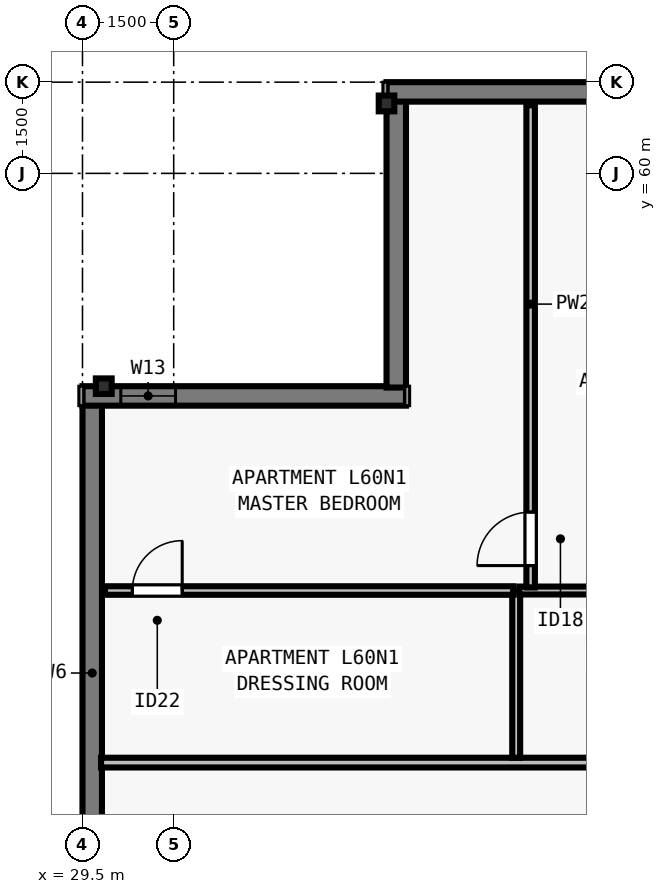
"""IFC4 building model, lengths in metres.
Left out: names, types, materials, properties, quantities, classifications, styles, units other than length and angle.
Written with IfcOpenShell. Run it as: python <this file> out.ifc"""

import sys

from ifc_helpers import new_model, si_unit, direction, frame, frame_2d, origin, origin_2d, place, context, subcontext, project, spatial, rectangle, i_section, extrude, element, fill, save


model = new_model("IFC4")
c1 = context("Model", 3, precision=1e-05, world=origin(), true_north=direction((0.0, 1.0)))
c2 = subcontext(c1, "Body", "Model", "MODEL_VIEW")
j1 = project(units=[si_unit("LENGTHUNIT", "METRE"), si_unit("PLANEANGLEUNIT", "RADIAN")], contexts=[c1])
p1 = place(None, origin())
s1 = spatial("IfcSite", under=j1, at=p1, CompositionType="ELEMENT")
p2 = place(p1, origin())
s2 = spatial("IfcBuilding", under=s1, at=p2, CompositionType="ELEMENT")
p3 = place(p2, frame((0.0, 0.0, 220.0)))
s3 = spatial("IfcBuildingStorey", under=s2, at=p3, CompositionType="ELEMENT", Elevation=220.0)
for number, where, z_axis, x_axis in (
    (1, (34.5, 61.15, 0.0), (0.0, 0.0, 1.0), (1.0, 0.0, 0.0)),
    (2, (29.85, 56.5, 0.0), (0.0, 0.0, 1.0), (0.0, 1.0, 0.0)),
):
    element("IfcColumn", number, at=place(p3, frame(where, z_axis=z_axis, x_axis=x_axis)), inside=s3, PredefinedType="COLUMN", context=c2, shape_type="SweptSolid", body=[
        extrude(i_section(OverallWidth=0.256, OverallDepth=0.26, WebThickness=0.01, FlangeThickness=0.017, FilletRadius=0.013, at=origin_2d()), origin(), (0.0, 0.0, 1.0), 3.5),
    ])
p4 = place(p3, frame((29.66, 21.5, 0.0), z_axis=(0.0, 0.0, 1.0), x_axis=(0.0, 1.0, 0.0)))
e3 = element("IfcWall", 3, at=p4, inside=s3, PredefinedType="SOLIDWALL", context=c2, shape_type="SweptSolid", body=[
    extrude(rectangle(XDim=34.702, YDim=0.32, at=frame_2d((17.351, 0.0))), origin(), (0.0, 0.0, 1.0), 3.29),
])
p5 = place(p4, frame((4.312, 0.0, 0.8)))
e4 = element("IfcOpeningElement", 4, at=p5, cuts=e3, PredefinedType="OPENING", context=c2, shape_type="SweptSolid", body=[
    extrude(rectangle(XDim=1.55, YDim=1.678, at=frame_2d((0.775, 0.839))), frame((0.0, 0.17, 0.0), z_axis=(0.0, -1.0, 0.0), x_axis=(1.0, 0.0, 0.0)), (0.0, 0.0, 1.0), 0.34),
])
p6 = place(p4, frame((6.738, 0.0, 0.8)))
e5 = element("IfcOpeningElement", 5, at=p6, cuts=e3, PredefinedType="OPENING", context=c2, shape_type="SweptSolid", body=[
    extrude(rectangle(XDim=1.85, YDim=1.678, at=frame_2d((0.925, 0.839))), frame((0.0, 0.17, 0.0), z_axis=(0.0, -1.0, 0.0), x_axis=(1.0, 0.0, 0.0)), (0.0, 0.0, 1.0), 0.34),
])
p7 = place(p4, frame((10.263, 0.0, 0.8)))
e6 = element("IfcOpeningElement", 6, at=p7, cuts=e3, PredefinedType="OPENING", context=c2, shape_type="SweptSolid", body=[
    extrude(rectangle(XDim=1.55, YDim=1.678, at=frame_2d((0.775, 0.839))), frame((0.0, 0.17, 0.0), z_axis=(0.0, -1.0, 0.0), x_axis=(1.0, 0.0, 0.0)), (0.0, 0.0, 1.0), 0.34),
])
p8 = place(p4, frame((14.738, 0.0, 0.8)))
e7 = element("IfcOpeningElement", 7, at=p8, cuts=e3, PredefinedType="OPENING", context=c2, shape_type="SweptSolid", body=[
    extrude(rectangle(XDim=1.85, YDim=1.678, at=frame_2d((0.925, 0.839))), frame((0.0, 0.17, 0.0), z_axis=(0.0, -1.0, 0.0), x_axis=(1.0, 0.0, 0.0)), (0.0, 0.0, 1.0), 0.34),
])
p9 = place(p4, frame((18.264, 0.0, 0.8)))
e8 = element("IfcOpeningElement", 8, at=p9, cuts=e3, PredefinedType="OPENING", context=c2, shape_type="SweptSolid", body=[
    extrude(rectangle(XDim=1.55, YDim=1.678, at=frame_2d((0.775, 0.839))), frame((0.0, 0.17, 0.0), z_axis=(0.0, -1.0, 0.0), x_axis=(1.0, 0.0, 0.0)), (0.0, 0.0, 1.0), 0.34),
])
p10 = place(p4, frame((24.164, 0.0, 0.8)))
e9 = element("IfcOpeningElement", 9, at=p10, cuts=e3, PredefinedType="OPENING", context=c2, shape_type="SweptSolid", body=[
    extrude(rectangle(XDim=1.55, YDim=1.678, at=frame_2d((0.775, 0.839))), frame((0.0, 0.17, 0.0), z_axis=(0.0, -1.0, 0.0), x_axis=(1.0, 0.0, 0.0)), (0.0, 0.0, 1.0), 0.34),
])
p11 = place(p3, frame((29.5, 56.34, 0.0), z_axis=(0.0, 0.0, 1.0), x_axis=(1.0, 0.0, 0.0)))
e10 = element("IfcWall", 10, at=p11, inside=s3, PredefinedType="SOLIDWALL", context=c2, shape_type="SweptSolid", body=[
    extrude(rectangle(XDim=5.32, YDim=0.32, at=frame_2d((2.66, 0.0))), origin(), (0.0, 0.0, 1.0), 3.29),
])
p12 = place(p11, frame((0.63, 0.0, 0.8)))
e11 = element("IfcOpeningElement", 11, at=p12, cuts=e10, PredefinedType="OPENING", context=c2, shape_type="SweptSolid", body=[
    extrude(rectangle(XDim=0.9, YDim=1.678, at=frame_2d((0.45, 0.839))), frame((0.0, 0.17, 0.0), z_axis=(0.0, -1.0, 0.0), x_axis=(1.0, 0.0, 0.0)), (0.0, 0.0, 1.0), 0.34),
])
p13 = place(p3, frame((34.66, 56.478, 0.0), z_axis=(0.0, 0.0, 1.0), x_axis=(0.0, 1.0, 0.0)))
e12 = element("IfcWall", 12, at=p13, inside=s3, PredefinedType="SOLIDWALL", context=c2, shape_type="SweptSolid", body=[
    extrude(rectangle(XDim=4.724, YDim=0.32, at=frame_2d((2.362, 0.0))), origin(), (0.0, 0.0, 1.0), 3.29),
])
p14 = place(p3, frame((34.5, 61.34, 0.0), z_axis=(0.0, 0.0, 1.0), x_axis=(1.0, 0.0, 0.0)))
e13 = element("IfcWall", 13, at=p14, inside=s3, PredefinedType="SOLIDWALL", context=c2, shape_type="SweptSolid", body=[
    extrude(rectangle(XDim=5.602, YDim=0.32, at=frame_2d((2.801, 0.0))), origin(), (0.0, 0.0, 1.0), 3.29),
])
p15 = place(p3, frame((29.805, 50.31, 0.0), z_axis=(0.0, 0.0, 1.0), x_axis=(1.0, 0.0, 0.0)))
e14 = element("IfcWall", 14, at=p15, inside=s3, PredefinedType="PARTITIONING", context=c2, shape_type="SweptSolid", body=[
    extrude(rectangle(XDim=44.39, YDim=0.16, at=frame_2d((22.195, 0.0))), origin(), (0.0, 0.0, 1.0), 2.958),
])
p16 = place(p15, frame((10.448, 0.0, 0.0)))
e15 = element("IfcOpeningElement", 15, at=p16, cuts=e14, PredefinedType="OPENING", context=c2, shape_type="SweptSolid", body=[
    extrude(rectangle(XDim=0.96, YDim=2.18, at=frame_2d((0.48, 1.09))), frame((0.0, 0.09, 0.0), z_axis=(0.0, -1.0, 0.0), x_axis=(1.0, 0.0, 0.0)), (0.0, 0.0, 1.0), 0.18),
])
p17 = place(p15, frame((32.528, 0.0, 0.0)))
e16 = element("IfcOpeningElement", 16, at=p17, cuts=e14, PredefinedType="OPENING", context=c2, shape_type="SweptSolid", body=[
    extrude(rectangle(XDim=0.96, YDim=2.18, at=frame_2d((0.48, 1.09))), frame((0.0, 0.09, 0.0), z_axis=(0.0, -1.0, 0.0), x_axis=(1.0, 0.0, 0.0)), (0.0, 0.0, 1.0), 0.18),
])
p18 = place(p3, frame((36.633, 50.39, 0.0), z_axis=(0.0, 0.0, 1.0), x_axis=(0.0, 1.0, 0.0)))
e17 = element("IfcWall", 17, at=p18, inside=s3, PredefinedType="PLUMBINGWALL", context=c2, shape_type="SweptSolid", body=[
    extrude(rectangle(XDim=2.75, YDim=0.13, at=frame_2d((1.375, 0.0))), origin(), (0.0, 0.0, 1.0), 3.29),
])
p19 = place(p3, frame((36.683, 53.14, 0.0), z_axis=(0.0, 0.0, 1.0), x_axis=(1.0, 0.0, 0.0)))
e18 = element("IfcWall", 18, at=p19, inside=s3, PredefinedType="PLUMBINGWALL", context=c2, shape_type="SweptSolid", body=[
    extrude(rectangle(XDim=2.85, YDim=0.13, at=frame_2d((1.425, 0.0))), origin(), (0.0, 0.0, 1.0), 3.29),
])
p20 = place(p3, frame((36.87, 53.19, 0.0), z_axis=(0.0, 0.0, 1.0), x_axis=(0.0, 1.0, 0.0)))
e19 = element("IfcWall", 19, at=p20, inside=s3, PredefinedType="PARTITIONING", context=c2, shape_type="SweptSolid", body=[
    extrude(rectangle(XDim=7.93, YDim=0.14, at=frame_2d((3.965, 0.0))), origin(), (0.0, 0.0, 1.0), 2.573),
])
p21 = place(p20, frame((0.36, 0.0, 0.0)))
e20 = element("IfcOpeningElement", 20, at=p21, cuts=e19, PredefinedType="OPENING", context=c2, shape_type="SweptSolid", body=[
    extrude(rectangle(XDim=0.88, YDim=2.1, at=frame_2d((0.44, 1.05))), frame((0.0, 0.08, 0.0), z_axis=(0.0, -1.0, 0.0), x_axis=(1.0, 0.0, 0.0)), (0.0, 0.0, 1.0), 0.16),
])
p22 = place(p3, frame((29.87, 53.14, 0.0), z_axis=(0.0, 0.0, 1.0), x_axis=(1.0, 0.0, 0.0)))
e21 = element("IfcWall", 21, at=p22, inside=s3, PredefinedType="PARTITIONING", context=c2, shape_type="SweptSolid", body=[
    extrude(rectangle(XDim=6.712, YDim=0.14, at=frame_2d((3.356, 0.0))), origin(), (0.0, 0.0, 1.0), 2.958),
])
p23 = place(p22, frame((0.45, 0.0, 0.0)))
e22 = element("IfcOpeningElement", 22, at=p23, cuts=e21, PredefinedType="OPENING", context=c2, shape_type="SweptSolid", body=[
    extrude(rectangle(XDim=0.82, YDim=2.1, at=frame_2d((0.41, 1.05))), frame((0.0, 0.08, 0.0), z_axis=(0.0, -1.0, 0.0), x_axis=(1.0, 0.0, 0.0)), (0.0, 0.0, 1.0), 0.16),
])
p24 = place(p12, origin())
e23 = element("IfcWindow", 23, at=p24, inside=s3, PartitioningType="SINGLE_PANEL", PredefinedType="WINDOW", context=c2, shape_type="SweptSolid", body=[
    extrude(rectangle(XDim=0.9, YDim=1.678, at=frame_2d((0.45, 0.839))), frame((0.0, -0.04, 0.0), z_axis=(0.0, -1.0, 0.0), x_axis=(1.0, 0.0, 0.0)), (0.0, 0.0, 1.0), 0.06),
])
fill(e11, e23)
p25 = place(p23, origin())
e24 = element("IfcDoor", 24, at=p25, inside=s3, OperationType="SINGLE_SWING_RIGHT", PredefinedType="DOOR", context=c2, shape_type="SweptSolid", body=[
    extrude(rectangle(XDim=0.82, YDim=2.1, at=frame_2d((0.41, 1.05))), frame((0.0, 0.025, 0.0), z_axis=(0.0, -1.0, 0.0), x_axis=(1.0, 0.0, 0.0)), (0.0, 0.0, 1.0), 0.05),
])
fill(e22, e24)
p26 = place(p21, origin())
e25 = element("IfcDoor", 25, at=p26, inside=s3, OperationType="SINGLE_SWING_LEFT", PredefinedType="DOOR", context=c2, shape_type="SweptSolid", body=[
    extrude(rectangle(XDim=0.88, YDim=2.1, at=frame_2d((0.44, 1.05))), frame((0.0, 0.025, 0.0), z_axis=(0.0, -1.0, 0.0), x_axis=(1.0, 0.0, 0.0)), (0.0, 0.0, 1.0), 0.05),
])
fill(e20, e25)
save(model, sys.argv[1])
